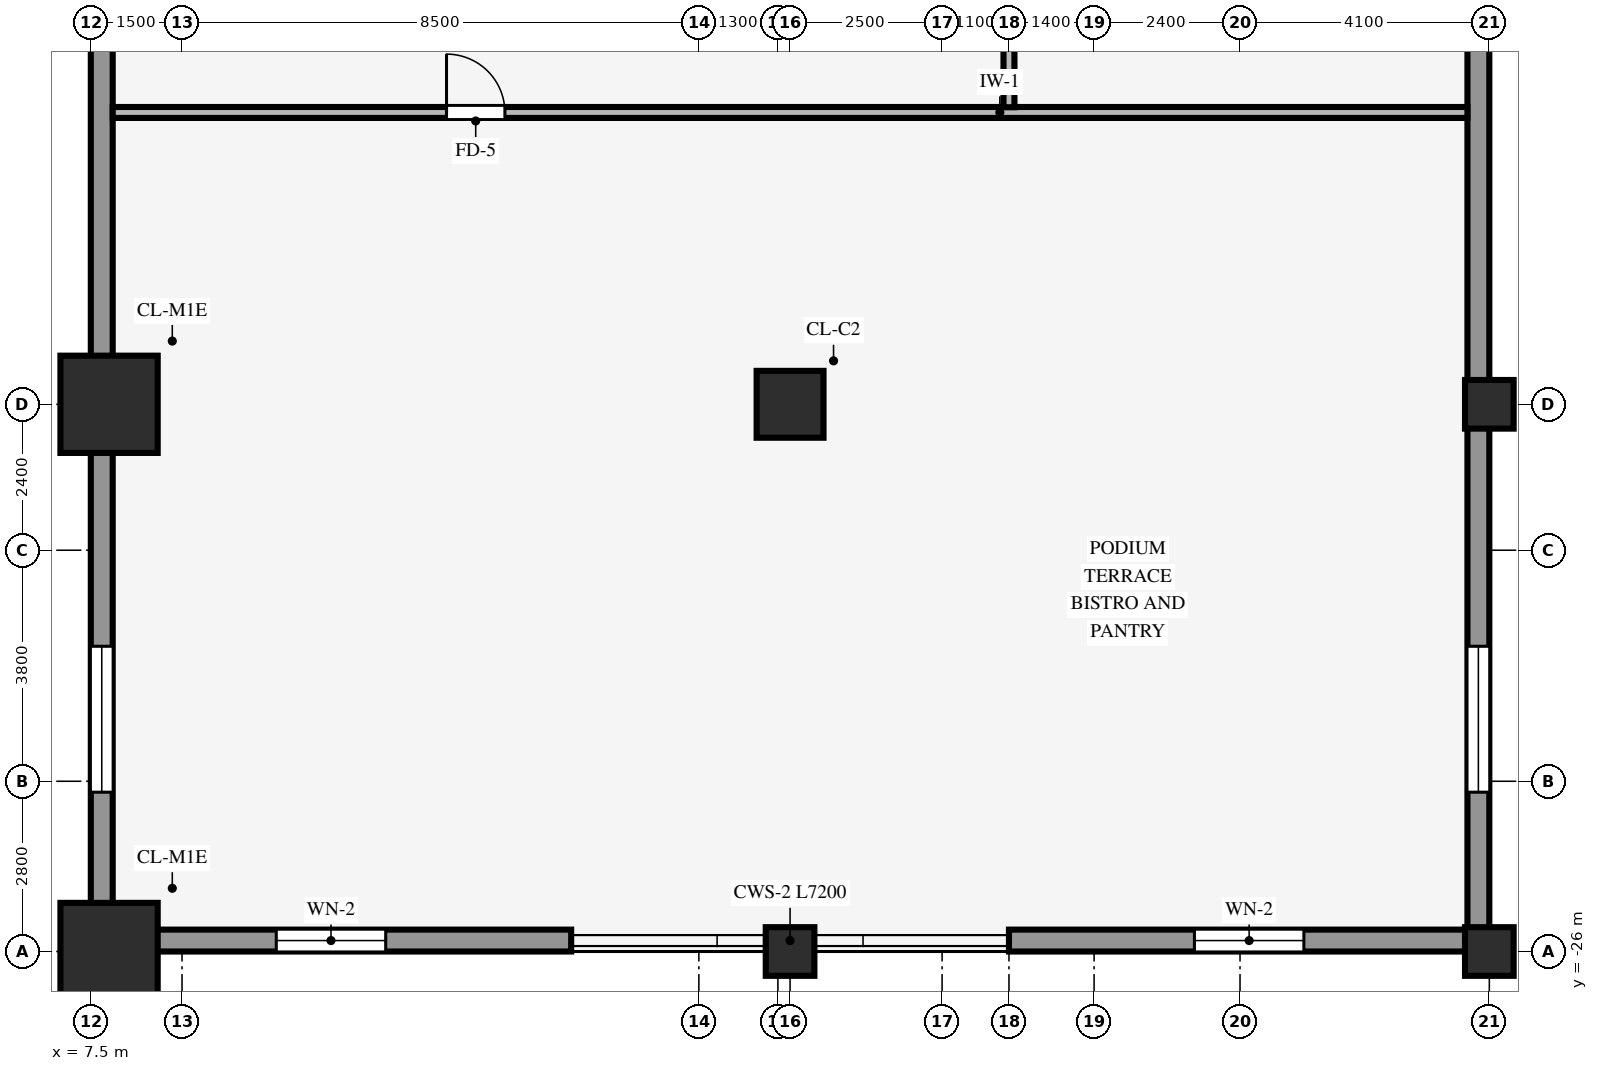
"""IFC4 building model, lengths in metres.
Left out: names, types, materials, properties, quantities, classifications, styles, units other than length and angle.
Written with IfcOpenShell. Run it as: python <this file> out.ifc"""

import sys

from ifc_helpers import new_model, si_unit, direction, frame, frame_2d, origin, origin_2d, place, context, subcontext, project, spatial, rectangle, hollow_rectangle, extrude, source, transform, mapped, element, fill, save


model = new_model("IFC4")
c1 = context("Model", 3, precision=1e-05, world=origin(), true_north=direction((0.0, 1.0)))
c2 = subcontext(c1, "Body", "Model", "MODEL_VIEW")
j1 = project(units=[si_unit("LENGTHUNIT", "METRE"), si_unit("PLANEANGLEUNIT", "RADIAN")], contexts=[c1])
p1 = place(None, origin())
s1 = spatial("IfcSite", under=j1, at=p1, CompositionType="ELEMENT")
p2 = place(p1, origin())
s2 = spatial("IfcBuilding", under=s1, at=p2, CompositionType="ELEMENT")
p3 = place(p2, frame((0.0, 0.0, 9.2)))
s3 = spatial("IfcBuildingStorey", under=s2, at=p3, CompositionType="ELEMENT", Elevation=9.2)
for number, where, z_axis, x_axis in (
    (1, (7.8, -26.0, 0.0), (0.0, 0.0, 1.0), (1.0, 0.0, 0.0)),
    (2, (7.8, -17.0, 0.0), (0.0, 0.0, 1.0), (1.0, 0.0, 0.0)),
):
    element("IfcColumn", number, at=place(p3, frame(where, z_axis=z_axis, x_axis=x_axis)), inside=s3, PredefinedType="COLUMN", context=c2, shape_type="SweptSolid", body=[
        extrude(rectangle(XDim=1.6, YDim=1.6, at=origin_2d()), origin(), (0.0, 0.0, 1.0), 4.28),
    ])
p4 = place(p3, frame((19.0, -26.0, 0.0), z_axis=(0.0, 0.0, 1.0), x_axis=(1.0, 0.0, 0.0)))
e3 = element("IfcColumn", 3, at=p4, inside=s3, PredefinedType="COLUMN", context=c2, shape_type="SweptSolid", body=[
    extrude(hollow_rectangle(XDim=0.8, YDim=0.8, WallThickness=0.055, InnerFilletRadius=0.055, OuterFilletRadius=0.11, at=origin_2d()), origin(), (0.0, 0.0, 1.0), 4.28),
])
p5 = place(p3, frame((19.0, -17.0, 0.0), z_axis=(0.0, 0.0, 1.0), x_axis=(1.0, 0.0, 0.0)))
e4 = element("IfcColumn", 4, at=p5, inside=s3, PredefinedType="COLUMN", context=c2, shape_type="SweptSolid", body=[
    extrude(rectangle(XDim=1.1, YDim=1.1, at=origin_2d()), origin(), (0.0, 0.0, 1.0), 4.28),
])
for number, where, z_axis, x_axis in (
    (5, (30.5, -26.0, 0.0), (0.0, 0.0, 1.0), (1.0, 0.0, 0.0)),
    (6, (30.5, -17.0, 0.0), (0.0, 0.0, 1.0), (1.0, 0.0, 0.0)),
):
    element("IfcColumn", number, at=place(p3, frame(where, z_axis=z_axis, x_axis=x_axis)), inside=s3, PredefinedType="COLUMN", context=c2, shape_type="SweptSolid", body=[
        extrude(hollow_rectangle(XDim=0.8, YDim=0.8, WallThickness=0.055, InnerFilletRadius=0.055, OuterFilletRadius=0.11, at=origin_2d()), origin(), (0.0, 0.0, 1.0), 4.28),
    ])
p6 = place(p3, frame((7.5, -25.82, 0.0), z_axis=(0.0, 0.0, 1.0), x_axis=(1.0, 0.0, 0.0)))
e7 = element("IfcWall", 7, at=p6, inside=s3, PredefinedType="STANDARD", context=c2, shape_type="SweptSolid", body=[
    extrude(rectangle(XDim=7.9, YDim=0.36, at=frame_2d((3.95, 0.0))), origin(), (0.0, 0.0, 1.0), 3.615),
])
p7 = place(p6, frame((3.05, 0.0, 0.85)))
e8 = element("IfcOpeningElement", 8, at=p7, cuts=e7, PredefinedType="OPENING", context=c2, shape_type="SweptSolid", body=[
    extrude(rectangle(XDim=1.8, YDim=2.35, at=frame_2d((0.9, 1.175))), frame((0.0, 0.19, 0.0), z_axis=(0.0, -1.0, 0.0), x_axis=(1.0, 0.0, 0.0)), (0.0, 0.0, 1.0), 0.38),
])
p8 = place(p3, frame((22.6, -25.82, 0.0), z_axis=(0.0, 0.0, 1.0), x_axis=(1.0, 0.0, 0.0)))
e9 = element("IfcWall", 9, at=p8, inside=s3, PredefinedType="STANDARD", context=c2, shape_type="SweptSolid", body=[
    extrude(rectangle(XDim=7.9, YDim=0.36, at=frame_2d((3.95, 0.0))), origin(), (0.0, 0.0, 1.0), 3.615),
])
p9 = place(p8, frame((3.05, 0.0, 0.85)))
e10 = element("IfcOpeningElement", 10, at=p9, cuts=e9, PredefinedType="OPENING", context=c2, shape_type="SweptSolid", body=[
    extrude(rectangle(XDim=1.8, YDim=2.35, at=frame_2d((0.9, 1.175))), frame((0.0, 0.19, 0.0), z_axis=(0.0, -1.0, 0.0), x_axis=(1.0, 0.0, 0.0)), (0.0, 0.0, 1.0), 0.38),
])
p10 = place(p3, frame((30.32, -25.644, 0.0), z_axis=(0.0, 0.0, 1.0), x_axis=(0.0, 1.0, 0.0)))
e11 = element("IfcWall", 11, at=p10, inside=s3, PredefinedType="STANDARD", context=c2, shape_type="SweptSolid", body=[
    extrude(rectangle(XDim=51.288, YDim=0.36, at=frame_2d((25.644, 0.0))), origin(), (0.0, 0.0, 1.0), 3.615),
])
p11 = place(p10, frame((2.264, 0.0, 0.85)))
e12 = element("IfcOpeningElement", 12, at=p11, cuts=e11, PredefinedType="OPENING", context=c2, shape_type="SweptSolid", body=[
    extrude(rectangle(XDim=2.4, YDim=2.45, at=frame_2d((1.2, 1.225))), frame((0.0, 0.19, 0.0), z_axis=(0.0, -1.0, 0.0), x_axis=(1.0, 0.0, 0.0)), (0.0, 0.0, 1.0), 0.38),
])
p12 = place(p10, frame((17.051, 0.0, 0.85)))
e13 = element("IfcOpeningElement", 13, at=p12, cuts=e11, PredefinedType="OPENING", context=c2, shape_type="SweptSolid", body=[
    extrude(rectangle(XDim=2.4, YDim=2.45, at=frame_2d((1.2, 1.225))), frame((0.0, 0.19, 0.0), z_axis=(0.0, -1.0, 0.0), x_axis=(1.0, 0.0, 0.0)), (0.0, 0.0, 1.0), 0.38),
])
p13 = place(p10, frame((21.979, 0.0, 0.85)))
e14 = element("IfcOpeningElement", 14, at=p13, cuts=e11, PredefinedType="OPENING", context=c2, shape_type="SweptSolid", body=[
    extrude(rectangle(XDim=2.4, YDim=2.45, at=frame_2d((1.2, 1.225))), frame((0.0, 0.19, 0.0), z_axis=(0.0, -1.0, 0.0), x_axis=(1.0, 0.0, 0.0)), (0.0, 0.0, 1.0), 0.38),
])
p14 = place(p10, frame((26.908, 0.0, 0.85)))
e15 = element("IfcOpeningElement", 15, at=p14, cuts=e11, PredefinedType="OPENING", context=c2, shape_type="SweptSolid", body=[
    extrude(rectangle(XDim=2.4, YDim=2.45, at=frame_2d((1.2, 1.225))), frame((0.0, 0.19, 0.0), z_axis=(0.0, -1.0, 0.0), x_axis=(1.0, 0.0, 0.0)), (0.0, 0.0, 1.0), 0.38),
])
p15 = place(p10, frame((31.837, 0.0, 0.85)))
e16 = element("IfcOpeningElement", 16, at=p15, cuts=e11, PredefinedType="OPENING", context=c2, shape_type="SweptSolid", body=[
    extrude(rectangle(XDim=2.4, YDim=2.45, at=frame_2d((1.2, 1.225))), frame((0.0, 0.19, 0.0), z_axis=(0.0, -1.0, 0.0), x_axis=(1.0, 0.0, 0.0)), (0.0, 0.0, 1.0), 0.38),
])
p16 = place(p10, frame((46.624, 0.0, 0.85)))
e17 = element("IfcOpeningElement", 17, at=p16, cuts=e11, PredefinedType="OPENING", context=c2, shape_type="SweptSolid", body=[
    extrude(rectangle(XDim=2.4, YDim=2.45, at=frame_2d((1.2, 1.225))), frame((0.0, 0.19, 0.0), z_axis=(0.0, -1.0, 0.0), x_axis=(1.0, 0.0, 0.0)), (0.0, 0.0, 1.0), 0.38),
])
p17 = place(p3, frame((7.68, -25.644, 0.0), z_axis=(0.0, 0.0, 1.0), x_axis=(0.0, 1.0, 0.0)))
e18 = element("IfcWall", 18, at=p17, inside=s3, PredefinedType="STANDARD", context=c2, shape_type="SweptSolid", body=[
    extrude(rectangle(XDim=51.288, YDim=0.36, at=frame_2d((25.644, 0.0))), origin(), (0.0, 0.0, 1.0), 3.649),
])
p18 = place(p17, frame((2.264, 0.0, 0.85)))
e19 = element("IfcOpeningElement", 19, at=p18, cuts=e18, PredefinedType="OPENING", context=c2, shape_type="SweptSolid", body=[
    extrude(rectangle(XDim=2.4, YDim=2.45, at=frame_2d((1.2, 1.225))), frame((0.0, 0.19, 0.0), z_axis=(0.0, -1.0, 0.0), x_axis=(1.0, 0.0, 0.0)), (0.0, 0.0, 1.0), 0.38),
])
p19 = place(p17, frame((17.051, 0.0, 0.85)))
e20 = element("IfcOpeningElement", 20, at=p19, cuts=e18, PredefinedType="OPENING", context=c2, shape_type="SweptSolid", body=[
    extrude(rectangle(XDim=2.4, YDim=2.45, at=frame_2d((1.2, 1.225))), frame((0.0, 0.19, 0.0), z_axis=(0.0, -1.0, 0.0), x_axis=(1.0, 0.0, 0.0)), (0.0, 0.0, 1.0), 0.38),
])
p20 = place(p17, frame((21.979, 0.0, 0.85)))
e21 = element("IfcOpeningElement", 21, at=p20, cuts=e18, PredefinedType="OPENING", context=c2, shape_type="SweptSolid", body=[
    extrude(rectangle(XDim=2.4, YDim=2.45, at=frame_2d((1.2, 1.225))), frame((0.0, 0.19, 0.0), z_axis=(0.0, -1.0, 0.0), x_axis=(1.0, 0.0, 0.0)), (0.0, 0.0, 1.0), 0.38),
])
p21 = place(p17, frame((26.908, 0.0, 0.85)))
e22 = element("IfcOpeningElement", 22, at=p21, cuts=e18, PredefinedType="OPENING", context=c2, shape_type="SweptSolid", body=[
    extrude(rectangle(XDim=2.4, YDim=2.45, at=frame_2d((1.2, 1.225))), frame((0.0, 0.19, 0.0), z_axis=(0.0, -1.0, 0.0), x_axis=(1.0, 0.0, 0.0)), (0.0, 0.0, 1.0), 0.38),
])
p22 = place(p17, frame((31.837, 0.0, 0.85)))
e23 = element("IfcOpeningElement", 23, at=p22, cuts=e18, PredefinedType="OPENING", context=c2, shape_type="SweptSolid", body=[
    extrude(rectangle(XDim=2.4, YDim=2.45, at=frame_2d((1.2, 1.225))), frame((0.0, 0.19, 0.0), z_axis=(0.0, -1.0, 0.0), x_axis=(1.0, 0.0, 0.0)), (0.0, 0.0, 1.0), 0.38),
])
p23 = place(p17, frame((46.624, 0.0, 0.85)))
e24 = element("IfcOpeningElement", 24, at=p23, cuts=e18, PredefinedType="OPENING", context=c2, shape_type="SweptSolid", body=[
    extrude(rectangle(XDim=2.4, YDim=2.45, at=frame_2d((1.2, 1.225))), frame((0.0, 0.19, 0.0), z_axis=(0.0, -1.0, 0.0), x_axis=(1.0, 0.0, 0.0)), (0.0, 0.0, 1.0), 0.38),
])
p24 = place(p3, frame((7.86, -12.2, 0.0), z_axis=(0.0, 0.0, 1.0), x_axis=(1.0, 0.0, 0.0)))
e25 = element("IfcWall", 25, at=p24, inside=s3, PredefinedType="PARTITIONING", context=c2, shape_type="SweptSolid", body=[
    extrude(rectangle(XDim=22.28, YDim=0.18, at=frame_2d((11.14, 0.0))), origin(), (0.0, 0.0, 1.0), 4.27),
])
p25 = place(p24, frame((5.49, 0.0, 0.0)))
e26 = element("IfcOpeningElement", 26, at=p25, cuts=e25, PredefinedType="OPENING", context=c2, shape_type="SweptSolid", body=[
    extrude(rectangle(XDim=0.96, YDim=2.1, at=frame_2d((0.48, 1.05))), frame((0.0, 0.1, 0.0), z_axis=(0.0, -1.0, 0.0), x_axis=(1.0, 0.0, 0.0)), (0.0, 0.0, 1.0), 0.2),
])
p26 = place(p3, frame((22.6, -12.114, 0.0), z_axis=(0.0, 0.0, 1.0), x_axis=(0.0, 1.0, 0.0)))
e27 = element("IfcWall", 27, at=p26, inside=s3, PredefinedType="PARTITIONING", context=c2, shape_type="SweptSolid", body=[
    extrude(rectangle(XDim=37.919, YDim=0.18, at=frame_2d((18.959, 0.0))), origin(), (0.0, 0.0, 1.0), 4.27),
])
p27 = place(p26, frame((11.634, 0.0, 0.0)))
e28 = element("IfcOpeningElement", 28, at=p27, cuts=e27, PredefinedType="OPENING", context=c2, shape_type="SweptSolid", body=[
    extrude(rectangle(XDim=0.96, YDim=2.1, at=frame_2d((0.48, 1.05))), frame((0.0, 0.1, 0.0), z_axis=(0.0, -1.0, 0.0), x_axis=(1.0, 0.0, 0.0)), (0.0, 0.0, 1.0), 0.2),
])
p28 = place(p26, frame((29.534, 0.0, 0.0)))
e29 = element("IfcOpeningElement", 29, at=p28, cuts=e27, PredefinedType="OPENING", context=c2, shape_type="SweptSolid", body=[
    extrude(rectangle(XDim=0.96, YDim=2.1, at=frame_2d((0.48, 1.05))), frame((0.0, 0.1, 0.0), z_axis=(0.0, -1.0, 0.0), x_axis=(1.0, 0.0, 0.0)), (0.0, 0.0, 1.0), 0.2),
])
m1 = source(origin(), c2, "Body", "SweptSolid", [
    extrude(rectangle(XDim=1.8, YDim=2.35, at=frame_2d((0.9, 1.175))), frame((0.0, 0.03, 0.0), z_axis=(0.0, -1.0, 0.0), x_axis=(1.0, 0.0, 0.0)), (0.0, 0.0, 1.0), 0.06),
])
p29 = place(p7, origin())
e30 = element("IfcWindow", 30, at=p29, inside=s3, PartitioningType="SINGLE_PANEL", PredefinedType="WINDOW", context=c2, shape_type="MappedRepresentation", body=[
    mapped(m1, transform((0.0, 0.0, 0.0), scale=1.0)),
])
fill(e8, e30)
p30 = place(p9, origin())
e31 = element("IfcWindow", 31, at=p30, inside=s3, PartitioningType="SINGLE_PANEL", PredefinedType="WINDOW", context=c2, shape_type="MappedRepresentation", body=[
    mapped(m1, transform((0.0, 0.0, 0.0), scale=1.0)),
])
fill(e10, e31)
m2 = source(origin(), c2, "Body", "SweptSolid", [
    extrude(rectangle(XDim=2.4, YDim=2.45, at=frame_2d((1.2, 1.225))), frame((0.0, 0.03, 0.0), z_axis=(0.0, -1.0, 0.0), x_axis=(1.0, 0.0, 0.0)), (0.0, 0.0, 1.0), 0.06),
])
p31 = place(p11, origin())
e32 = element("IfcWindow", 32, at=p31, inside=s3, PartitioningType="SINGLE_PANEL", PredefinedType="WINDOW", context=c2, shape_type="MappedRepresentation", body=[
    mapped(m2, transform((0.0, 0.0, 0.0), scale=1.0)),
])
fill(e12, e32)
p32 = place(p18, origin())
e33 = element("IfcWindow", 33, at=p32, inside=s3, PartitioningType="SINGLE_PANEL", PredefinedType="WINDOW", context=c2, shape_type="MappedRepresentation", body=[
    mapped(m2, transform((0.0, 0.0, 0.0), scale=1.0)),
])
fill(e19, e33)
m3 = source(origin(), c2, "Body", "SweptSolid", [
    extrude(rectangle(XDim=0.96, YDim=2.1, at=frame_2d((0.48, 1.05))), frame((0.0, 0.025, 0.0), z_axis=(0.0, -1.0, 0.0), x_axis=(1.0, 0.0, 0.0)), (0.0, 0.0, 1.0), 0.05),
])
p33 = place(p25, origin())
e34 = element("IfcDoor", 34, at=p33, inside=s3, OperationType="SINGLE_SWING_LEFT", PredefinedType="DOOR", context=c2, shape_type="MappedRepresentation", body=[
    mapped(m3, transform((0.0, 0.0, 0.0), scale=1.0)),
])
fill(e26, e34)
save(model, sys.argv[1])
